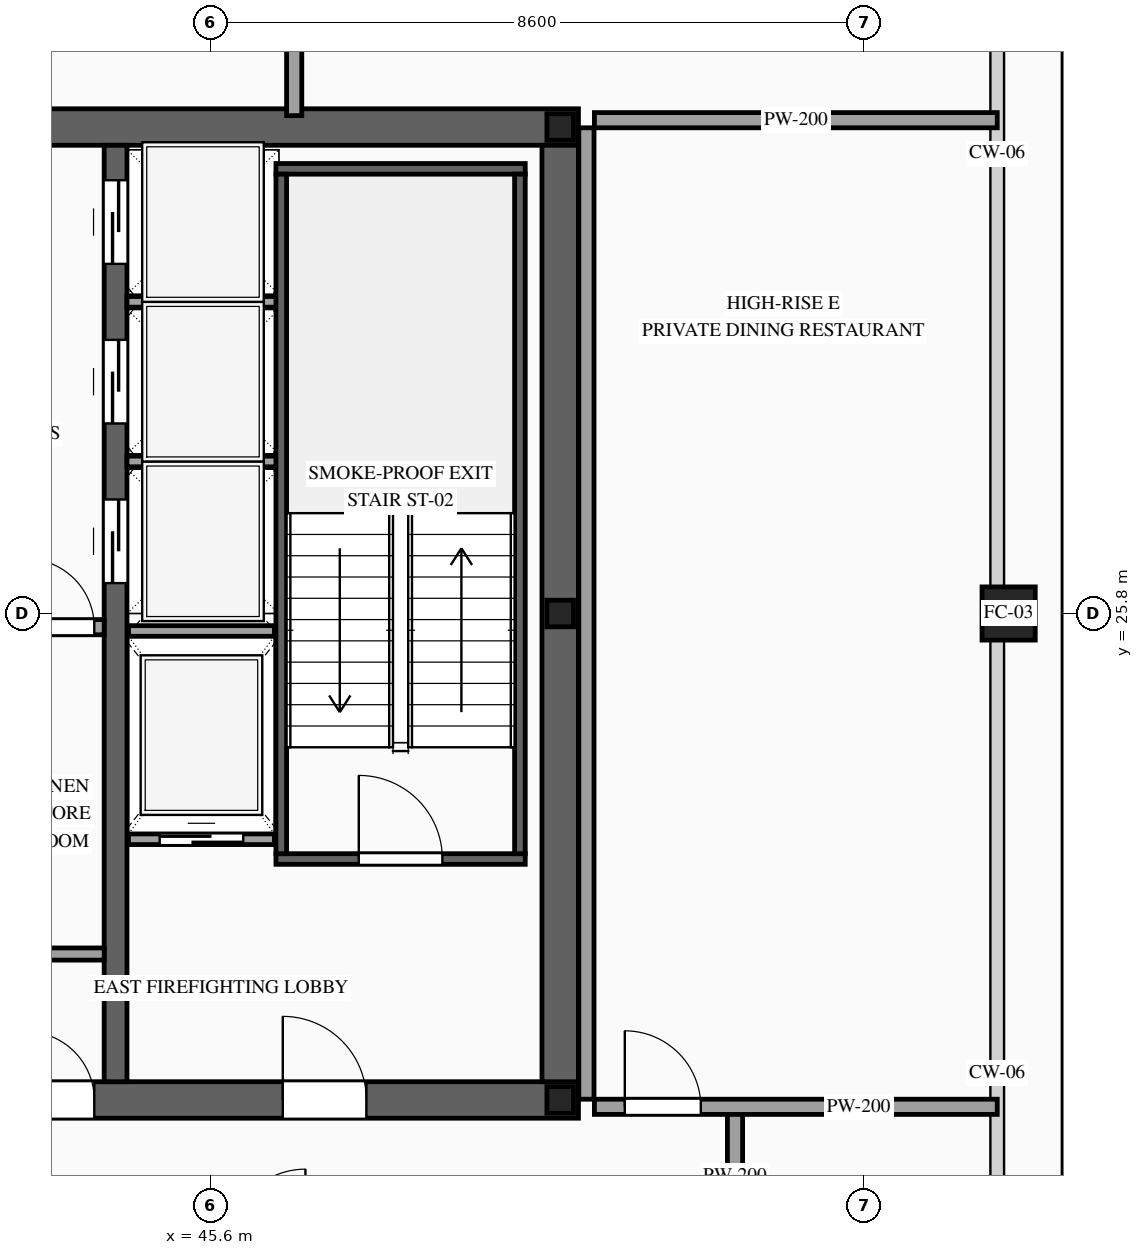
"""IFC4 building model, lengths in metres.
Left out: names, types, materials, properties, quantities, classifications, styles, units other than length and angle.
Written with IfcOpenShell. Run it as: python <this file> out.ifc"""

import sys

from ifc_helpers import new_model, si_unit, direction, frame, frame_2d, origin, origin_2d, place, context, subcontext, project, spatial, rectangle, hollow_rectangle, i_section, extrude, source, transform, mapped, element, fill, save


model = new_model("IFC4")
c1 = context("Model", 3, precision=1e-05, world=origin(), true_north=direction((0.0, 1.0)))
c2 = subcontext(c1, "Body", "Model", "MODEL_VIEW")
j1 = project(units=[si_unit("LENGTHUNIT", "METRE"), si_unit("PLANEANGLEUNIT", "RADIAN")], contexts=[c1])
p1 = place(None, origin())
s1 = spatial("IfcSite", under=j1, at=p1, CompositionType="ELEMENT")
p2 = place(p1, origin())
s2 = spatial("IfcBuilding", under=s1, at=p2, CompositionType="ELEMENT")
p3 = place(p2, frame((0.0, 0.0, 343.2)))
s3 = spatial("IfcBuildingStorey", under=s2, at=p3, CompositionType="ELEMENT", Elevation=343.2)
p4 = place(p3, frame((23.56, 19.4, 0.0), z_axis=(0.0, 0.0, 1.0), x_axis=(1.0, 0.0, 0.0)))
e1 = element("IfcWall", 1, at=p4, inside=s3, PredefinedType="SHEAR", context=c2, shape_type="SweptSolid", body=[
    extrude(rectangle(XDim=26.88, YDim=0.48, at=frame_2d((13.44, 0.0))), origin(), (0.0, 0.0, 1.0), 4.0),
])
p5 = place(p4, frame((1.89, 0.0, 0.0)))
e2 = element("IfcOpeningElement", 2, at=p5, cuts=e1, PredefinedType="OPENING", context=c2, shape_type="SweptSolid", body=[
    extrude(rectangle(XDim=1.1, YDim=2.2, at=frame_2d((0.55, 1.1))), frame((0.0, 0.255, 0.0), z_axis=(0.0, -1.0, 0.0), x_axis=(1.0, 0.0, 0.0)), (0.0, 0.0, 1.0), 0.51),
])
p6 = place(p4, frame((9.79, 0.0, 0.0)))
e3 = element("IfcOpeningElement", 3, at=p6, cuts=e1, PredefinedType="OPENING", context=c2, shape_type="SweptSolid", body=[
    extrude(rectangle(XDim=1.1, YDim=2.2, at=frame_2d((0.55, 1.1))), frame((0.0, 0.255, 0.0), z_axis=(0.0, -1.0, 0.0), x_axis=(1.0, 0.0, 0.0)), (0.0, 0.0, 1.0), 0.51),
])
p7 = place(p4, frame((22.99, 0.0, 0.0)))
e4 = element("IfcOpeningElement", 4, at=p7, cuts=e1, PredefinedType="OPENING", context=c2, shape_type="SweptSolid", body=[
    extrude(rectangle(XDim=1.1, YDim=2.2, at=frame_2d((0.55, 1.1))), frame((0.0, 0.255, 0.0), z_axis=(0.0, -1.0, 0.0), x_axis=(1.0, 0.0, 0.0)), (0.0, 0.0, 1.0), 0.51),
])
p8 = place(p4, frame((19.61, 0.0, 0.0)))
e5 = element("IfcOpeningElement", 5, at=p8, cuts=e1, PredefinedType="OPENING", context=c2, shape_type="SweptSolid", body=[
    extrude(rectangle(XDim=0.9, YDim=2.15, at=frame_2d((0.45, 1.075))), frame((0.0, 0.255, 0.0), z_axis=(0.0, -1.0, 0.0), x_axis=(1.0, 0.0, 0.0)), (0.0, 0.0, 1.0), 0.51),
])
p9 = place(p4, frame((18.17, 0.0, 0.0)))
e6 = element("IfcOpeningElement", 6, at=p9, cuts=e1, PredefinedType="OPENING", context=c2, shape_type="SweptSolid", body=[
    extrude(rectangle(XDim=0.9, YDim=2.15, at=frame_2d((0.45, 1.075))), frame((0.0, 0.255, 0.0), z_axis=(0.0, -1.0, 0.0), x_axis=(1.0, 0.0, 0.0)), (0.0, 0.0, 1.0), 0.51),
])
p10 = place(p3, frame((23.56, 32.2, 0.0), z_axis=(0.0, 0.0, 1.0), x_axis=(1.0, 0.0, 0.0)))
e7 = element("IfcWall", 7, at=p10, inside=s3, PredefinedType="SHEAR", context=c2, shape_type="SweptSolid", body=[
    extrude(rectangle(XDim=26.88, YDim=0.48, at=frame_2d((13.44, 0.0))), origin(), (0.0, 0.0, 1.0), 4.0),
])
p11 = place(p10, frame((4.51, 0.0, 0.0)))
e8 = element("IfcOpeningElement", 8, at=p11, cuts=e7, PredefinedType="OPENING", context=c2, shape_type="SweptSolid", body=[
    extrude(rectangle(XDim=0.9, YDim=2.15, at=frame_2d((0.45, 1.075))), frame((0.0, 0.255, 0.0), z_axis=(0.0, -1.0, 0.0), x_axis=(1.0, 0.0, 0.0)), (0.0, 0.0, 1.0), 0.51),
])
p12 = place(p10, frame((9.79, 0.0, 0.0)))
e9 = element("IfcOpeningElement", 9, at=p12, cuts=e7, PredefinedType="OPENING", context=c2, shape_type="SweptSolid", body=[
    extrude(rectangle(XDim=1.1, YDim=2.2, at=frame_2d((0.55, 1.1))), frame((0.0, 0.255, 0.0), z_axis=(0.0, -1.0, 0.0), x_axis=(1.0, 0.0, 0.0)), (0.0, 0.0, 1.0), 0.51),
])
p13 = place(p10, frame((15.64, 0.0, 0.0)))
e10 = element("IfcOpeningElement", 10, at=p13, cuts=e7, PredefinedType="OPENING", context=c2, shape_type="SweptSolid", body=[
    extrude(rectangle(XDim=1.1, YDim=2.2, at=frame_2d((0.55, 1.1))), frame((0.0, 0.255, 0.0), z_axis=(0.0, -1.0, 0.0), x_axis=(1.0, 0.0, 0.0)), (0.0, 0.0, 1.0), 0.51),
])
p14 = place(p10, frame((18.74, 0.0, 0.0)))
e11 = element("IfcOpeningElement", 11, at=p14, cuts=e7, PredefinedType="OPENING", context=c2, shape_type="SweptSolid", body=[
    extrude(rectangle(XDim=1.1, YDim=2.2, at=frame_2d((0.55, 1.1))), frame((0.0, 0.255, 0.0), z_axis=(0.0, -1.0, 0.0), x_axis=(1.0, 0.0, 0.0)), (0.0, 0.0, 1.0), 0.51),
])
m1 = source(origin(), c2, "Body", "SweptSolid", [
    extrude(rectangle(XDim=12.32, YDim=0.48, at=frame_2d((6.16, 0.0))), origin(), (0.0, 0.0, 1.0), 4.0),
])
p15 = place(p3, frame((50.2, 19.64, 0.0), z_axis=(0.0, 0.0, 1.0), x_axis=(0.0, 1.0, 0.0)))
e12 = element("IfcWall", 12, at=p15, inside=s3, PredefinedType="SHEAR", context=c2, shape_type="MappedRepresentation", body=[
    mapped(m1, transform((0.0, 0.0, 0.0), scale=1.0)),
])
p16 = place(p3, frame((44.35, 19.64, 0.0), z_axis=(0.0, 0.0, 1.0), x_axis=(0.0, 1.0, 0.0)))
e13 = element("IfcWall", 13, at=p16, inside=s3, PredefinedType="SOLIDWALL", context=c2, shape_type="SweptSolid", body=[
    extrude(rectangle(XDim=12.32, YDim=0.3, at=frame_2d((6.16, 0.0))), origin(), (0.0, 0.0, 1.0), 4.0),
])
p17 = place(p16, frame((6.56, 0.0, 0.0)))
e14 = element("IfcOpeningElement", 14, at=p17, cuts=e13, PredefinedType="OPENING", context=c2, shape_type="SweptSolid", body=[
    extrude(rectangle(XDim=1.1, YDim=2.2, at=frame_2d((0.55, 1.1))), frame((0.0, 0.165, 0.0), z_axis=(0.0, -1.0, 0.0), x_axis=(1.0, 0.0, 0.0)), (0.0, 0.0, 1.0), 0.33),
])
p18 = place(p16, frame((8.66, 0.0, 0.0)))
e15 = element("IfcOpeningElement", 15, at=p18, cuts=e13, PredefinedType="OPENING", context=c2, shape_type="SweptSolid", body=[
    extrude(rectangle(XDim=1.1, YDim=2.2, at=frame_2d((0.55, 1.1))), frame((0.0, 0.165, 0.0), z_axis=(0.0, -1.0, 0.0), x_axis=(1.0, 0.0, 0.0)), (0.0, 0.0, 1.0), 0.33),
])
p19 = place(p16, frame((10.76, 0.0, 0.0)))
e16 = element("IfcOpeningElement", 16, at=p19, cuts=e13, PredefinedType="OPENING", context=c2, shape_type="SweptSolid", body=[
    extrude(rectangle(XDim=1.1, YDim=2.2, at=frame_2d((0.55, 1.1))), frame((0.0, 0.165, 0.0), z_axis=(0.0, -1.0, 0.0), x_axis=(1.0, 0.0, 0.0)), (0.0, 0.0, 1.0), 0.33),
])
m2 = source(origin(), c2, "Body", "SweptSolid", [
    extrude(i_section(OverallWidth=0.35, OverallDepth=0.35, WebThickness=0.012, FlangeThickness=0.019, at=origin_2d()), origin(), (0.0, 0.0, 1.0), 4.0),
])
for number, where, z_axis, x_axis in (
    (17, (50.2, 19.4, 0.0), (0.0, 0.0, 1.0), (1.0, 0.0, 0.0)),
    (18, (50.2, 25.8, 0.0), (0.0, 0.0, 1.0), (1.0, 0.0, 0.0)),
    (19, (50.2, 32.2, 0.0), (0.0, 0.0, 1.0), (1.0, 0.0, 0.0)),
):
    element("IfcColumn", number, at=place(p3, frame(where, z_axis=z_axis, x_axis=x_axis)), inside=s3, PredefinedType="COLUMN", context=c2, shape_type="MappedRepresentation", body=[
        mapped(m2, transform((0.0, 0.0, 0.0), scale=1.0)),
    ])
m3 = source(origin(), c2, "Body", "SweptSolid", [
    extrude(hollow_rectangle(XDim=0.7, YDim=0.7, WallThickness=0.032, at=origin_2d()), origin(), (0.0, 0.0, 1.0), 4.0),
])
p20 = place(p3, frame((56.1, 25.8, 0.0), z_axis=(0.0, 0.0, 1.0), x_axis=(1.0, 0.0, 0.0)))
e20 = element("IfcColumn", 20, at=p20, inside=s3, PredefinedType="COLUMN", context=c2, shape_type="MappedRepresentation", body=[
    mapped(m3, transform((0.0, 0.0, 0.0), scale=1.0)),
])
p21 = place(p3, frame((44.52, 22.83, 0.0), z_axis=(0.0, 0.0, 1.0), x_axis=(1.0, 0.0, 0.0)))
e21 = element("IfcWall", 21, at=p21, inside=s3, PredefinedType="SOLIDWALL", context=c2, shape_type="SweptSolid", body=[
    extrude(rectangle(XDim=1.92, YDim=0.14, at=frame_2d((0.96, 0.0))), origin(), (0.0, 0.0, 1.0), 3.76),
])
p22 = place(p21, frame((0.41, 0.0, 0.0)))
e22 = element("IfcOpeningElement", 22, at=p22, cuts=e21, PredefinedType="OPENING", context=c2, shape_type="SweptSolid", body=[
    extrude(rectangle(XDim=1.1, YDim=2.2, at=frame_2d((0.55, 1.1))), frame((0.0, 0.085, 0.0), z_axis=(0.0, -1.0, 0.0), x_axis=(1.0, 0.0, 0.0)), (0.0, 0.0, 1.0), 0.17),
])
m4 = source(origin(), c2, "Body", "SweptSolid", [
    extrude(rectangle(XDim=1.92, YDim=0.14, at=frame_2d((0.96, 0.0))), origin(), (0.0, 0.0, 1.0), 3.76),
])
p23 = place(p3, frame((44.52, 25.57, 0.0), z_axis=(0.0, 0.0, 1.0), x_axis=(1.0, 0.0, 0.0)))
e23 = element("IfcWall", 23, at=p23, inside=s3, PredefinedType="SOLIDWALL", context=c2, shape_type="MappedRepresentation", body=[
    mapped(m4, transform((0.0, 0.0, 0.0), scale=1.0)),
])
m5 = source(origin(), c2, "Body", "SweptSolid", [
    extrude(rectangle(XDim=2.0, YDim=0.14, at=frame_2d((1.0, 0.0))), origin(), (0.0, 0.0, 1.0), 3.76),
])
for number, where, z_axis, x_axis in (
    (24, (44.5, 27.8, 0.0), (0.0, 0.0, 1.0), (1.0, 0.0, 0.0)),
    (25, (44.5, 29.9, 0.0), (0.0, 0.0, 1.0), (1.0, 0.0, 0.0)),
):
    element("IfcWall", number, at=place(p3, frame(where, z_axis=z_axis, x_axis=x_axis)), inside=s3, PredefinedType="SOLIDWALL", context=c2, shape_type="MappedRepresentation", body=[
        mapped(m5, transform((0.0, 0.0, 0.0), scale=1.0)),
    ])
p24 = place(p3, frame((46.46, 22.57, 0.0), z_axis=(0.0, 0.0, 1.0), x_axis=(1.0, 0.0, 0.0)))
e26 = element("IfcWall", 26, at=p24, inside=s3, PredefinedType="SOLIDWALL", context=c2, shape_type="SweptSolid", body=[
    extrude(rectangle(XDim=3.28, YDim=0.14, at=frame_2d((1.64, 0.0))), origin(), (0.0, 0.0, 1.0), 3.76),
])
p25 = place(p24, frame((1.09, 0.0, 0.0)))
e27 = element("IfcOpeningElement", 27, at=p25, cuts=e26, PredefinedType="OPENING", context=c2, shape_type="SweptSolid", body=[
    extrude(rectangle(XDim=1.1, YDim=2.2, at=frame_2d((0.55, 1.1))), frame((0.0, 0.085, 0.0), z_axis=(0.0, -1.0, 0.0), x_axis=(1.0, 0.0, 0.0)), (0.0, 0.0, 1.0), 0.17),
])
m6 = source(origin(), c2, "Body", "SweptSolid", [
    extrude(rectangle(XDim=3.28, YDim=0.14, at=frame_2d((1.64, 0.0))), origin(), (0.0, 0.0, 1.0), 3.76),
])
p26 = place(p3, frame((46.46, 31.65, 0.0), z_axis=(0.0, 0.0, 1.0), x_axis=(1.0, 0.0, 0.0)))
e28 = element("IfcWall", 28, at=p26, inside=s3, PredefinedType="SOLIDWALL", context=c2, shape_type="MappedRepresentation", body=[
    mapped(m6, transform((0.0, 0.0, 0.0), scale=1.0)),
])
m7 = source(origin(), c2, "Body", "SweptSolid", [
    extrude(rectangle(XDim=8.94, YDim=0.14, at=frame_2d((4.47, 0.0))), origin(), (0.0, 0.0, 1.0), 3.76),
])
for number, where, z_axis, x_axis in (
    (29, (46.53, 22.64, 0.0), (0.0, 0.0, 1.0), (0.0, 1.0, 0.0)),
    (30, (49.67, 22.64, 0.0), (0.0, 0.0, 1.0), (0.0, 1.0, 0.0)),
):
    element("IfcWall", number, at=place(p3, frame(where, z_axis=z_axis, x_axis=x_axis)), inside=s3, PredefinedType="SOLIDWALL", context=c2, shape_type="MappedRepresentation", body=[
        mapped(m7, transform((0.0, 0.0, 0.0), scale=1.0)),
    ])
m8 = source(origin(), c2, "Body", "SweptSolid", [
    extrude(rectangle(XDim=1.17, YDim=0.16, at=frame_2d((0.585, 0.0))), origin(), (0.0, 0.0, 1.0), 3.76),
])
p27 = place(p3, frame((43.03, 21.32, 0.0), z_axis=(0.0, 0.0, 1.0), x_axis=(1.0, 0.0, 0.0)))
e31 = element("IfcWall", 31, at=p27, inside=s3, PredefinedType="PARTITIONING", context=c2, shape_type="MappedRepresentation", body=[
    mapped(m8, transform((0.0, 0.0, 0.0), scale=1.0)),
])
p28 = place(p3, frame((43.05, 25.62, 0.0), z_axis=(0.0, 0.0, 1.0), x_axis=(1.0, 0.0, 0.0)))
e32 = element("IfcWall", 32, at=p28, inside=s3, PredefinedType="PARTITIONING", context=c2, shape_type="SweptSolid", body=[
    extrude(rectangle(XDim=1.15, YDim=0.2, at=frame_2d((0.575, 0.0))), origin(), (0.0, 0.0, 1.0), 3.76),
])
p29 = place(p28, frame((0.12, 0.0, 0.0)))
e33 = element("IfcOpeningElement", 33, at=p29, cuts=e32, PredefinedType="OPENING", context=c2, shape_type="SweptSolid", body=[
    extrude(rectangle(XDim=0.9, YDim=2.15, at=frame_2d((0.45, 1.075))), frame((0.0, 0.115, 0.0), z_axis=(0.0, -1.0, 0.0), x_axis=(1.0, 0.0, 0.0)), (0.0, 0.0, 1.0), 0.23),
])
m9 = source(origin(), c2, "Body", "SweptSolid", [
    extrude(rectangle(XDim=1.7, YDim=0.2, at=frame_2d((0.85, 0.0))), origin(), (0.0, 0.0, 1.0), 3.76),
])
for number, where, z_axis, x_axis in (
    (34, (46.7, 32.35, 0.0), (0.0, 0.0, 1.0), (0.0, 1.0, 0.0)),
    (35, (52.5, 17.55, 0.0), (0.0, 0.0, 1.0), (0.0, 1.0, 0.0)),
):
    element("IfcWall", number, at=place(p3, frame(where, z_axis=z_axis, x_axis=x_axis)), inside=s3, PredefinedType="PARTITIONING", context=c2, shape_type="MappedRepresentation", body=[
        mapped(m9, transform((0.0, 0.0, 0.0), scale=1.0)),
    ])
p30 = place(p3, frame((50.65, 19.31, 0.0), z_axis=(0.0, 0.0, 1.0), x_axis=(1.0, 0.0, 0.0)))
e36 = element("IfcWall", 36, at=p30, inside=s3, PredefinedType="PARTITIONING", context=c2, shape_type="SweptSolid", body=[
    extrude(rectangle(XDim=5.3, YDim=0.2, at=frame_2d((2.65, 0.0))), origin(), (0.0, 0.0, 1.0), 3.305),
])
p31 = place(p30, frame((0.4, 0.0, 0.0)))
e37 = element("IfcOpeningElement", 37, at=p31, cuts=e36, PredefinedType="OPENING", context=c2, shape_type="SweptSolid", body=[
    extrude(rectangle(XDim=1.0, YDim=2.2, at=frame_2d((0.5, 1.1))), frame((0.0, 0.115, 0.0), z_axis=(0.0, -1.0, 0.0), x_axis=(1.0, 0.0, 0.0)), (0.0, 0.0, 1.0), 0.23),
])
m10 = source(origin(), c2, "Body", "SweptSolid", [
    extrude(rectangle(XDim=5.3, YDim=0.2, at=frame_2d((2.65, 0.0))), origin(), (0.0, 0.0, 1.0), 3.305),
])
p32 = place(p3, frame((50.65, 32.29, 0.0), z_axis=(0.0, 0.0, 1.0), x_axis=(1.0, 0.0, 0.0)))
e38 = element("IfcWall", 38, at=p32, inside=s3, PredefinedType="PARTITIONING", context=c2, shape_type="MappedRepresentation", body=[
    mapped(m10, transform((0.0, 0.0, 0.0), scale=1.0)),
])
m11 = source(origin(), c2, "Body", "SweptSolid", [
    extrude(rectangle(XDim=12.78, YDim=0.2, at=frame_2d((6.39, 0.0))), origin(), (0.0, 0.0, 1.0), 3.76),
])
p33 = place(p3, frame((50.545, 19.41, 0.0), z_axis=(0.0, 0.0, 1.0), x_axis=(0.0, 1.0, 0.0)))
e39 = element("IfcWall", 39, at=p33, inside=s3, PredefinedType="PARTITIONING", context=c2, shape_type="MappedRepresentation", body=[
    mapped(m11, transform((0.0, 0.0, 0.0), scale=1.0)),
])
m12 = source(origin(), c2, "Body", "SweptSolid", [
    extrude(rectangle(XDim=1.1, YDim=2.2, at=frame_2d((0.55, 1.1))), frame((0.0, 0.025, 0.0), z_axis=(0.0, -1.0, 0.0), x_axis=(1.0, 0.0, 0.0)), (0.0, 0.0, 1.0), 0.05),
])
p34 = place(p22, origin())
e40 = element("IfcDoor", 40, at=p34, inside=s3, OperationType="SLIDING_TO_RIGHT", PredefinedType="DOOR", context=c2, shape_type="MappedRepresentation", body=[
    mapped(m12, transform((0.0, 0.0, 0.0), scale=1.0)),
])
fill(e22, e40)
p35 = place(p17, origin())
e41 = element("IfcDoor", 41, at=p35, inside=s3, OperationType="SLIDING_TO_LEFT", PredefinedType="DOOR", context=c2, shape_type="MappedRepresentation", body=[
    mapped(m12, transform((0.0, 0.0, 0.0), scale=1.0)),
])
fill(e14, e41)
p36 = place(p18, origin())
e42 = element("IfcDoor", 42, at=p36, inside=s3, OperationType="SLIDING_TO_RIGHT", PredefinedType="DOOR", context=c2, shape_type="MappedRepresentation", body=[
    mapped(m12, transform((0.0, 0.0, 0.0), scale=1.0)),
])
fill(e15, e42)
p37 = place(p19, origin())
e43 = element("IfcDoor", 43, at=p37, inside=s3, OperationType="SLIDING_TO_LEFT", PredefinedType="DOOR", context=c2, shape_type="MappedRepresentation", body=[
    mapped(m12, transform((0.0, 0.0, 0.0), scale=1.0)),
])
fill(e16, e43)
m13 = source(origin(), c2, "Body", "SweptSolid", [
    extrude(rectangle(XDim=1.1, YDim=2.2, at=frame_2d((0.55, 1.1))), frame((0.0, 0.025, 0.0), z_axis=(0.0, -1.0, 0.0), x_axis=(1.0, 0.0, 0.0)), (0.0, 0.0, 1.0), 0.05),
])
p38 = place(p25, origin())
e44 = element("IfcDoor", 44, at=p38, inside=s3, OperationType="SINGLE_SWING_LEFT", PredefinedType="DOOR", context=c2, shape_type="MappedRepresentation", body=[
    mapped(m13, transform((0.0, 0.0, 0.0), scale=1.0)),
])
fill(e27, e44)
p39 = place(p7, origin())
e45 = element("IfcDoor", 45, at=p39, inside=s3, OperationType="SINGLE_SWING_LEFT", PredefinedType="DOOR", context=c2, shape_type="MappedRepresentation", body=[
    mapped(m13, transform((0.0, 0.0, 0.0), scale=1.0)),
])
fill(e4, e45)
m14 = source(origin(), c2, "Body", "SweptSolid", [
    extrude(rectangle(XDim=0.9, YDim=2.15, at=frame_2d((0.45, 1.075))), frame((0.0, 0.025, 0.0), z_axis=(0.0, -1.0, 0.0), x_axis=(1.0, 0.0, 0.0)), (0.0, 0.0, 1.0), 0.05),
])
p40 = place(p8, origin())
e46 = element("IfcDoor", 46, at=p40, inside=s3, OperationType="SINGLE_SWING_LEFT", PredefinedType="DOOR", context=c2, shape_type="MappedRepresentation", body=[
    mapped(m14, transform((0.0, 0.0, 0.0), scale=1.0)),
])
fill(e5, e46)
p41 = place(p29, origin())
e47 = element("IfcDoor", 47, at=p41, inside=s3, OperationType="SINGLE_SWING_LEFT", PredefinedType="DOOR", context=c2, shape_type="MappedRepresentation", body=[
    mapped(m14, transform((0.0, 0.0, 0.0), scale=1.0)),
])
fill(e33, e47)
m15 = source(origin(), c2, "Body", "SweptSolid", [
    extrude(rectangle(XDim=1.0, YDim=2.2, at=frame_2d((0.5, 1.1))), frame((0.0, 0.025, 0.0), z_axis=(0.0, -1.0, 0.0), x_axis=(1.0, 0.0, 0.0)), (0.0, 0.0, 1.0), 0.05),
])
p42 = place(p31, origin())
e48 = element("IfcDoor", 48, at=p42, inside=s3, OperationType="SINGLE_SWING_LEFT", PredefinedType="DOOR", context=c2, shape_type="MappedRepresentation", body=[
    mapped(m15, transform((0.0, 0.0, 0.0), scale=1.0)),
])
fill(e37, e48)
save(model, sys.argv[1])
